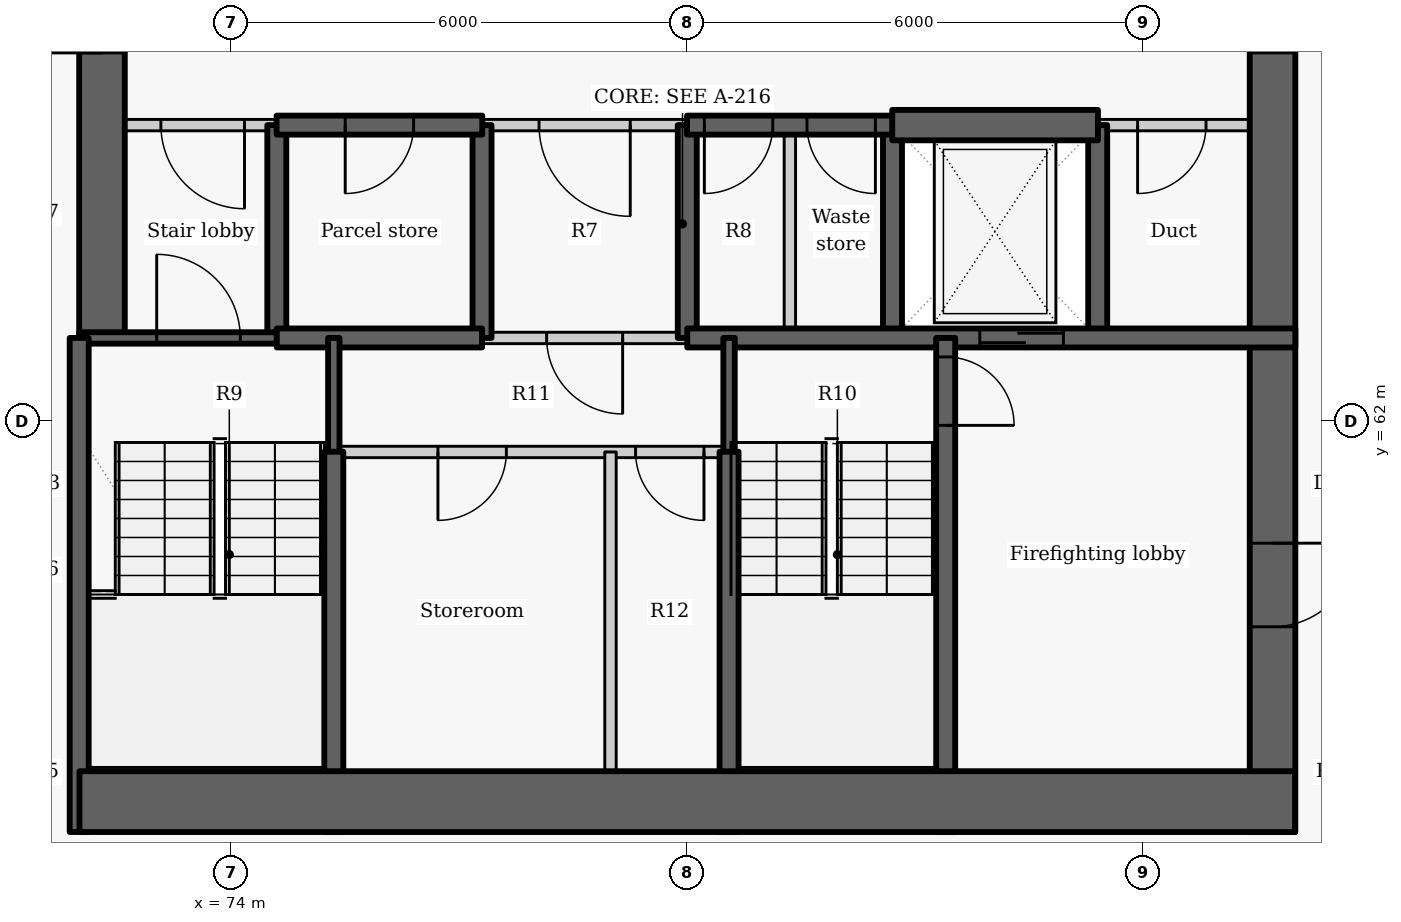
"""IFC4 building model, lengths in metres.
Left out: names, types, materials, properties, quantities, classifications, styles, units other than length and angle.
Written with IfcOpenShell. Run it as: python <this file> out.ifc"""

import sys

from ifc_helpers import new_model, si_unit, direction, frame, frame_2d, origin, place, context, subcontext, project, spatial, rectangle, extrude, element, fill, save


model = new_model("IFC4")
c1 = context("Model", 3, precision=1e-05, world=origin(), true_north=direction((0.0, 1.0)))
c2 = subcontext(c1, "Body", "Model", "MODEL_VIEW")
j1 = project(units=[si_unit("LENGTHUNIT", "METRE"), si_unit("PLANEANGLEUNIT", "RADIAN")], contexts=[c1])
p1 = place(None, origin())
s1 = spatial("IfcSite", under=j1, at=p1, CompositionType="ELEMENT")
p2 = place(p1, origin())
s2 = spatial("IfcBuilding", under=s1, at=p2, CompositionType="ELEMENT")
p3 = place(p2, frame((0.0, 0.0, 77.7)))
s3 = spatial("IfcBuildingStorey", under=s2, at=p3, CompositionType="ELEMENT", Elevation=77.7)
p4 = place(p3, frame((74.6, 63.1, -0.41), z_axis=(0.0, 0.0, 1.0), x_axis=(0.0, 1.0, 0.0)))
e1 = element("IfcWall", 1, at=p4, inside=s3, PredefinedType="SHEAR", context=c2, shape_type="SweptSolid", body=[
    extrude(rectangle(XDim=2.8, YDim=0.25, at=frame_2d((1.4, 0.0))), origin(), (0.0, 0.0, 1.0), 3.435),
])
p5 = place(p3, frame((72.3, 63.1, -0.41), z_axis=(0.0, 0.0, 1.0), x_axis=(0.0, 1.0, 0.0)))
e2 = element("IfcWall", 2, at=p5, inside=s3, PredefinedType="SHEAR", context=c2, shape_type="SweptSolid", body=[
    extrude(rectangle(XDim=9.1, YDim=0.6, at=frame_2d((4.55, 0.0))), origin(), (0.0, 0.0, 1.0), 3.435),
])
p6 = place(p5, frame((3.75, 0.0, 0.41)))
e3 = element("IfcOpeningElement", 3, at=p6, cuts=e2, PredefinedType="OPENING", context=c2, shape_type="SweptSolid", body=[
    extrude(rectangle(XDim=1.5, YDim=2.1, at=frame_2d((0.75, 1.05))), frame((0.0, 0.31, 0.0), z_axis=(0.0, -1.0, 0.0), x_axis=(1.0, 0.0, 0.0)), (0.0, 0.0, 1.0), 0.62),
])
for number, where, z_axis, x_axis in (
    (4, (77.3, 63.1, -0.41), (0.0, 0.0, 1.0), (0.0, 1.0, 0.0)),
    (5, (80.0, 63.1, -0.41), (0.0, 0.0, 1.0), (0.0, 1.0, 0.0)),
    (6, (82.7, 63.1, -0.41), (0.0, 0.0, 1.0), (0.0, 1.0, 0.0)),
    (7, (85.4, 63.1, -0.41), (0.0, 0.0, 1.0), (0.0, 1.0, 0.0)),
):
    element("IfcWall", number, at=place(p3, frame(where, z_axis=z_axis, x_axis=x_axis)), inside=s3, PredefinedType="SHEAR", context=c2, shape_type="SweptSolid", body=[
        extrude(rectangle(XDim=2.8, YDim=0.25, at=frame_2d((1.4, 0.0))), origin(), (0.0, 0.0, 1.0), 3.435),
    ])
p7 = place(p3, frame((87.7, 72.2, -0.41), z_axis=(0.0, 0.0, 1.0), x_axis=(0.0, -1.0, 0.0)))
e8 = element("IfcWall", 8, at=p7, inside=s3, PredefinedType="SHEAR", context=c2, shape_type="SweptSolid", body=[
    extrude(rectangle(XDim=15.6, YDim=0.6, at=frame_2d((7.8, 0.0))), origin(), (0.0, 0.0, 1.0), 3.435),
])
p8 = place(p7, frame((3.85, 0.0, 0.41)))
e9 = element("IfcOpeningElement", 9, at=p8, cuts=e8, PredefinedType="OPENING", context=c2, shape_type="SweptSolid", body=[
    extrude(rectangle(XDim=1.5, YDim=2.1, at=frame_2d((0.75, 1.05))), frame((0.0, 0.31, 0.0), z_axis=(0.0, -1.0, 0.0), x_axis=(1.0, 0.0, 0.0)), (0.0, 0.0, 1.0), 0.62),
])
p9 = place(p7, frame((11.8, 0.0, 0.41)))
e10 = element("IfcOpeningElement", 10, at=p9, cuts=e8, PredefinedType="OPENING", context=c2, shape_type="SweptSolid", body=[
    extrude(rectangle(XDim=1.1, YDim=2.1, at=frame_2d((0.55, 1.05))), frame((0.0, 0.31, 0.0), z_axis=(0.0, -1.0, 0.0), x_axis=(1.0, 0.0, 0.0)), (0.0, 0.0, 1.0), 0.62),
])
p10 = place(p3, frame((74.603, 65.9, 0.0), z_axis=(0.0, 0.0, 1.0), x_axis=(-1.0, 0.0, 0.0)))
e11 = element("IfcWall", 11, at=p10, inside=s3, PredefinedType="PARTITIONING", context=c2, shape_type="SweptSolid", body=[
    extrude(rectangle(XDim=2.603, YDim=0.15, at=frame_2d((1.302, 0.0))), origin(), (0.0, 0.0, 1.0), 3.025),
])
p11 = place(p10, frame((0.428, 0.0, 0.0)))
e12 = element("IfcOpeningElement", 12, at=p11, cuts=e11, PredefinedType="OPENING", context=c2, shape_type="SweptSolid", body=[
    extrude(rectangle(XDim=1.1, YDim=2.1, at=frame_2d((0.55, 1.05))), frame((0.0, 0.085, 0.0), z_axis=(0.0, -1.0, 0.0), x_axis=(1.0, 0.0, 0.0)), (0.0, 0.0, 1.0), 0.17),
])
p12 = place(p3, frame((80.003, 65.9, 0.0), z_axis=(0.0, 0.0, 1.0), x_axis=(-1.0, 0.0, 0.0)))
e13 = element("IfcWall", 13, at=p12, inside=s3, PredefinedType="PARTITIONING", context=c2, shape_type="SweptSolid", body=[
    extrude(rectangle(XDim=2.706, YDim=0.15, at=frame_2d((1.353, 0.0))), origin(), (0.0, 0.0, 1.0), 3.025),
])
p13 = place(p12, frame((0.753, 0.0, 0.0)))
e14 = element("IfcOpeningElement", 14, at=p13, cuts=e13, PredefinedType="OPENING", context=c2, shape_type="SweptSolid", body=[
    extrude(rectangle(XDim=1.2, YDim=2.1, at=frame_2d((0.6, 1.05))), frame((0.0, 0.085, 0.0), z_axis=(0.0, -1.0, 0.0), x_axis=(1.0, 0.0, 0.0)), (0.0, 0.0, 1.0), 0.17),
])
p14 = place(p3, frame((88.0, 65.9, 0.0), z_axis=(0.0, 0.0, 1.0), x_axis=(-1.0, 0.0, 0.0)))
e15 = element("IfcWall", 15, at=p14, inside=s3, PredefinedType="PARTITIONING", context=c2, shape_type="SweptSolid", body=[
    extrude(rectangle(XDim=2.603, YDim=0.15, at=frame_2d((1.302, 0.0))), origin(), (0.0, 0.0, 1.0), 3.025),
])
p15 = place(p14, frame((1.175, 0.0, 0.0)))
e16 = element("IfcOpeningElement", 16, at=p15, cuts=e15, PredefinedType="OPENING", context=c2, shape_type="SweptSolid", body=[
    extrude(rectangle(XDim=0.9, YDim=2.1, at=frame_2d((0.45, 1.05))), frame((0.0, 0.085, 0.0), z_axis=(0.0, -1.0, 0.0), x_axis=(1.0, 0.0, 0.0)), (0.0, 0.0, 1.0), 0.17),
])
p16 = place(p3, frame((77.303, 65.9, -0.41), z_axis=(0.0, 0.0, 1.0), x_axis=(-1.0, 0.0, 0.0)))
e17 = element("IfcWall", 17, at=p16, inside=s3, PredefinedType="SHEAR", context=c2, shape_type="SweptSolid", body=[
    extrude(rectangle(XDim=2.706, YDim=0.25, at=frame_2d((1.353, 0.0))), origin(), (0.0, 0.0, 1.0), 3.435),
])
p17 = place(p16, frame((0.903, 0.0, 0.41)))
e18 = element("IfcOpeningElement", 18, at=p17, cuts=e17, PredefinedType="OPENING", context=c2, shape_type="SweptSolid", body=[
    extrude(rectangle(XDim=0.9, YDim=2.1, at=frame_2d((0.45, 1.05))), frame((0.0, 0.135, 0.0), z_axis=(0.0, -1.0, 0.0), x_axis=(1.0, 0.0, 0.0)), (0.0, 0.0, 1.0), 0.27),
])
p18 = place(p3, frame((82.703, 65.9, -0.41), z_axis=(0.0, 0.0, 1.0), x_axis=(-1.0, 0.0, 0.0)))
e19 = element("IfcWall", 19, at=p18, inside=s3, PredefinedType="SHEAR", context=c2, shape_type="SweptSolid", body=[
    extrude(rectangle(XDim=2.706, YDim=0.25, at=frame_2d((1.353, 0.0))), origin(), (0.0, 0.0, 1.0), 3.435),
])
p19 = place(p18, frame((1.578, 0.0, 0.41)))
e20 = element("IfcOpeningElement", 20, at=p19, cuts=e19, PredefinedType="OPENING", context=c2, shape_type="SweptSolid", body=[
    extrude(rectangle(XDim=0.9, YDim=2.1, at=frame_2d((0.45, 1.05))), frame((0.0, 0.135, 0.0), z_axis=(0.0, -1.0, 0.0), x_axis=(1.0, 0.0, 0.0)), (0.0, 0.0, 1.0), 0.27),
])
p20 = place(p18, frame((0.228, 0.0, 0.41)))
e21 = element("IfcOpeningElement", 21, at=p20, cuts=e19, PredefinedType="OPENING", context=c2, shape_type="SweptSolid", body=[
    extrude(rectangle(XDim=0.9, YDim=2.1, at=frame_2d((0.45, 1.05))), frame((0.0, 0.135, 0.0), z_axis=(0.0, -1.0, 0.0), x_axis=(1.0, 0.0, 0.0)), (0.0, 0.0, 1.0), 0.27),
])
p21 = place(p3, frame((82.697, 65.9, -0.41), z_axis=(0.0, 0.0, 1.0), x_axis=(1.0, 0.0, 0.0)))
e22 = element("IfcWall", 22, at=p21, inside=s3, PredefinedType="SHEAR", context=c2, shape_type="SweptSolid", body=[
    extrude(rectangle(XDim=2.706, YDim=0.4, at=frame_2d((1.353, 0.0))), origin(), (0.0, 0.0, 1.0), 3.435),
])
p22 = place(p3, frame((72.0, 63.1, -0.41), z_axis=(0.0, 0.0, 1.0), x_axis=(1.0, 0.0, 0.0)))
e23 = element("IfcWall", 23, at=p22, inside=s3, PredefinedType="SHEAR", context=c2, shape_type="SweptSolid", body=[
    extrude(rectangle(XDim=2.6, YDim=0.15, at=frame_2d((1.3, 0.0))), origin(), (0.0, 0.0, 1.0), 3.435),
])
p23 = place(p22, frame((1.02, 0.0, 0.41)))
e24 = element("IfcOpeningElement", 24, at=p23, cuts=e23, PredefinedType="OPENING", context=c2, shape_type="SweptSolid", body=[
    extrude(rectangle(XDim=1.1, YDim=2.1, at=frame_2d((0.55, 1.05))), frame((0.0, 0.085, 0.0), z_axis=(0.0, -1.0, 0.0), x_axis=(1.0, 0.0, 0.0)), (0.0, 0.0, 1.0), 0.17),
])
p24 = place(p3, frame((74.6, 63.1, -0.41), z_axis=(0.0, 0.0, 1.0), x_axis=(1.0, 0.0, 0.0)))
e25 = element("IfcWall", 25, at=p24, inside=s3, PredefinedType="SHEAR", context=c2, shape_type="SweptSolid", body=[
    extrude(rectangle(XDim=2.7, YDim=0.25, at=frame_2d((1.35, 0.0))), origin(), (0.0, 0.0, 1.0), 3.435),
])
p25 = place(p3, frame((80.0, 63.1, -0.41), z_axis=(0.0, 0.0, 1.0), x_axis=(1.0, 0.0, 0.0)))
e26 = element("IfcWall", 26, at=p25, inside=s3, PredefinedType="SHEAR", context=c2, shape_type="SweptSolid", body=[
    extrude(rectangle(XDim=8.0, YDim=0.25, at=frame_2d((4.0, 0.0))), origin(), (0.0, 0.0, 1.0), 3.435),
])
p26 = place(p25, frame((3.849, 0.0, 0.41)))
e27 = element("IfcOpeningElement", 27, at=p26, cuts=e26, PredefinedType="OPENING", context=c2, shape_type="SweptSolid", body=[
    extrude(rectangle(XDim=1.1, YDim=2.1, at=frame_2d((0.55, 1.05))), frame((0.0, 0.135, 0.0), z_axis=(0.0, -1.0, 0.0), x_axis=(1.0, 0.0, 0.0)), (0.0, 0.0, 1.0), 0.27),
])
p27 = place(p3, frame((80.0, 63.1, 0.0), z_axis=(0.0, 0.0, 1.0), x_axis=(-1.0, 0.0, 0.0)))
e28 = element("IfcWall", 28, at=p27, inside=s3, PredefinedType="PARTITIONING", context=c2, shape_type="SweptSolid", body=[
    extrude(rectangle(XDim=2.7, YDim=0.15, at=frame_2d((1.35, 0.0))), origin(), (0.0, 0.0, 1.0), 3.025),
])
p28 = place(p27, frame((0.85, 0.0, 0.0)))
e29 = element("IfcOpeningElement", 29, at=p28, cuts=e28, PredefinedType="OPENING", context=c2, shape_type="SweptSolid", body=[
    extrude(rectangle(XDim=1.0, YDim=2.1, at=frame_2d((0.5, 1.05))), frame((0.0, 0.085, 0.0), z_axis=(0.0, -1.0, 0.0), x_axis=(1.0, 0.0, 0.0)), (0.0, 0.0, 1.0), 0.17),
])
p29 = place(p3, frame((81.35, 63.1, 0.0), z_axis=(0.0, 0.0, 1.0), x_axis=(0.0, 1.0, 0.0)))
e30 = element("IfcWall", 30, at=p29, inside=s3, PredefinedType="PARTITIONING", context=c2, shape_type="SweptSolid", body=[
    extrude(rectangle(XDim=2.8, YDim=0.15, at=frame_2d((1.4, 0.0))), origin(), (0.0, 0.0, 1.0), 3.025),
])
p30 = place(p3, frame((75.35, 61.597, -0.41), z_axis=(0.0, 0.0, 1.0), x_axis=(0.0, 1.0, 0.0)))
e31 = element("IfcWall", 31, at=p30, inside=s3, PredefinedType="SHEAR", context=c2, shape_type="SweptSolid", body=[
    extrude(rectangle(XDim=1.503, YDim=0.15, at=frame_2d((0.751, 0.0))), origin(), (0.0, 0.0, 1.0), 3.435),
])
p31 = place(p3, frame((75.35, 56.6, -0.41), z_axis=(0.0, 0.0, 1.0), x_axis=(0.0, 1.0, 0.0)))
e32 = element("IfcWall", 32, at=p31, inside=s3, PredefinedType="SHEAR", context=c2, shape_type="SweptSolid", body=[
    extrude(rectangle(XDim=5.003, YDim=0.25, at=frame_2d((2.501, 0.0))), origin(), (0.0, 0.0, 1.0), 3.435),
])
p32 = place(p3, frame((72.0, 56.6, -0.41), z_axis=(0.0, 0.0, 1.0), x_axis=(0.0, 1.0, 0.0)))
e33 = element("IfcWall", 33, at=p32, inside=s3, PredefinedType="SHEAR", context=c2, shape_type="SweptSolid", body=[
    extrude(rectangle(XDim=6.5, YDim=0.25, at=frame_2d((3.25, 0.0))), origin(), (0.0, 0.0, 1.0), 3.435),
])
p33 = place(p3, frame((83.4, 63.1, -0.41), z_axis=(0.0, 0.0, 1.0), x_axis=(0.0, -1.0, 0.0)))
e34 = element("IfcWall", 34, at=p33, inside=s3, PredefinedType="SHEAR", context=c2, shape_type="SweptSolid", body=[
    extrude(rectangle(XDim=6.5, YDim=0.25, at=frame_2d((3.25, 0.0))), origin(), (0.0, 0.0, 1.0), 3.435),
])
p34 = place(p33, frame((0.25, 0.0, 0.41)))
e35 = element("IfcOpeningElement", 35, at=p34, cuts=e34, PredefinedType="OPENING", context=c2, shape_type="SweptSolid", body=[
    extrude(rectangle(XDim=0.9, YDim=2.1, at=frame_2d((0.45, 1.05))), frame((0.0, 0.135, 0.0), z_axis=(0.0, -1.0, 0.0), x_axis=(1.0, 0.0, 0.0)), (0.0, 0.0, 1.0), 0.27),
])
p35 = place(p3, frame((80.55, 61.597, -0.41), z_axis=(0.0, 0.0, 1.0), x_axis=(0.0, 1.0, 0.0)))
e36 = element("IfcWall", 36, at=p35, inside=s3, PredefinedType="SHEAR", context=c2, shape_type="SweptSolid", body=[
    extrude(rectangle(XDim=1.503, YDim=0.15, at=frame_2d((0.751, 0.0))), origin(), (0.0, 0.0, 1.0), 3.435),
])
p36 = place(p3, frame((80.55, 56.6, -0.41), z_axis=(0.0, 0.0, 1.0), x_axis=(0.0, 1.0, 0.0)))
e37 = element("IfcWall", 37, at=p36, inside=s3, PredefinedType="SHEAR", context=c2, shape_type="SweptSolid", body=[
    extrude(rectangle(XDim=5.003, YDim=0.25, at=frame_2d((2.501, 0.0))), origin(), (0.0, 0.0, 1.0), 3.435),
])
p37 = place(p3, frame((80.55, 61.6, 0.0), z_axis=(0.0, 0.0, 1.0), x_axis=(-1.0, 0.0, 0.0)))
e38 = element("IfcWall", 38, at=p37, inside=s3, PredefinedType="PARTITIONING", context=c2, shape_type="SweptSolid", body=[
    extrude(rectangle(XDim=5.2, YDim=0.15, at=frame_2d((2.6, 0.0))), origin(), (0.0, 0.0, 1.0), 3.025),
])
p38 = place(p37, frame((2.93, 0.0, 0.0)))
e39 = element("IfcOpeningElement", 39, at=p38, cuts=e38, PredefinedType="OPENING", context=c2, shape_type="SweptSolid", body=[
    extrude(rectangle(XDim=0.9, YDim=2.1, at=frame_2d((0.45, 1.05))), frame((0.0, 0.085, 0.0), z_axis=(0.0, -1.0, 0.0), x_axis=(1.0, 0.0, 0.0)), (0.0, 0.0, 1.0), 0.17),
])
p39 = place(p37, frame((0.33, 0.0, 0.0)))
e40 = element("IfcOpeningElement", 40, at=p39, cuts=e38, PredefinedType="OPENING", context=c2, shape_type="SweptSolid", body=[
    extrude(rectangle(XDim=0.9, YDim=2.1, at=frame_2d((0.45, 1.05))), frame((0.0, 0.085, 0.0), z_axis=(0.0, -1.0, 0.0), x_axis=(1.0, 0.0, 0.0)), (0.0, 0.0, 1.0), 0.17),
])
p40 = place(p3, frame((78.99, 56.6, 0.0), z_axis=(0.0, 0.0, 1.0), x_axis=(0.0, 1.0, 0.0)))
e41 = element("IfcWall", 41, at=p40, inside=s3, PredefinedType="PARTITIONING", context=c2, shape_type="SweptSolid", body=[
    extrude(rectangle(XDim=5.0, YDim=0.15, at=frame_2d((2.5, 0.0))), origin(), (0.0, 0.0, 1.0), 3.025),
])
p41 = place(p3, frame((72.004, 57.0, -0.41), z_axis=(0.0, 0.0, 1.0), x_axis=(1.0, 0.0, 0.0)))
e42 = element("IfcWall", 42, at=p41, inside=s3, PredefinedType="SHEAR", context=c2, shape_type="SweptSolid", body=[
    extrude(rectangle(XDim=15.992, YDim=0.8, at=frame_2d((7.996, 0.0))), origin(), (0.0, 0.0, 1.0), 3.435),
])
p42 = place(p11, origin())
e43 = element("IfcDoor", 43, at=p42, inside=s3, OperationType="SINGLE_SWING_LEFT", PredefinedType="DOOR", context=c2, shape_type="SweptSolid", body=[
    extrude(rectangle(XDim=1.1, YDim=2.1, at=frame_2d((0.55, 1.05))), frame((0.0, 0.025, 0.0), z_axis=(0.0, -1.0, 0.0), x_axis=(1.0, 0.0, 0.0)), (0.0, 0.0, 1.0), 0.05),
])
fill(e12, e43)
p43 = place(p17, origin())
e44 = element("IfcDoor", 44, at=p43, inside=s3, OperationType="SINGLE_SWING_RIGHT", PredefinedType="DOOR", context=c2, shape_type="SweptSolid", body=[
    extrude(rectangle(XDim=0.9, YDim=2.1, at=frame_2d((0.45, 1.05))), frame((0.0, 0.025, 0.0), z_axis=(0.0, -1.0, 0.0), x_axis=(1.0, 0.0, 0.0)), (0.0, 0.0, 1.0), 0.05),
])
fill(e18, e44)
p44 = place(p13, origin())
e45 = element("IfcDoor", 45, at=p44, inside=s3, OperationType="DOUBLE_DOOR_SINGLE_SWING", PredefinedType="DOOR", context=c2, shape_type="SweptSolid", body=[
    extrude(rectangle(XDim=1.2, YDim=2.1, at=frame_2d((0.6, 1.05))), frame((0.0, 0.025, 0.0), z_axis=(0.0, -1.0, 0.0), x_axis=(1.0, 0.0, 0.0)), (0.0, 0.0, 1.0), 0.05),
])
fill(e14, e45)
p45 = place(p19, origin())
e46 = element("IfcDoor", 46, at=p45, inside=s3, OperationType="SINGLE_SWING_RIGHT", PredefinedType="DOOR", context=c2, shape_type="SweptSolid", body=[
    extrude(rectangle(XDim=0.9, YDim=2.1, at=frame_2d((0.45, 1.05))), frame((0.0, 0.025, 0.0), z_axis=(0.0, -1.0, 0.0), x_axis=(1.0, 0.0, 0.0)), (0.0, 0.0, 1.0), 0.05),
])
fill(e20, e46)
p46 = place(p20, origin())
e47 = element("IfcDoor", 47, at=p46, inside=s3, OperationType="SINGLE_SWING_LEFT", PredefinedType="DOOR", context=c2, shape_type="SweptSolid", body=[
    extrude(rectangle(XDim=0.9, YDim=2.1, at=frame_2d((0.45, 1.05))), frame((0.0, 0.025, 0.0), z_axis=(0.0, -1.0, 0.0), x_axis=(1.0, 0.0, 0.0)), (0.0, 0.0, 1.0), 0.05),
])
fill(e21, e47)
p47 = place(p26, origin())
e48 = element("IfcDoor", 48, at=p47, inside=s3, OperationType="SLIDING_TO_LEFT", PredefinedType="DOOR", context=c2, shape_type="SweptSolid", body=[
    extrude(rectangle(XDim=1.1, YDim=2.1, at=frame_2d((0.55, 1.05))), frame((0.0, 0.025, 0.0), z_axis=(0.0, -1.0, 0.0), x_axis=(1.0, 0.0, 0.0)), (0.0, 0.0, 1.0), 0.05),
])
fill(e27, e48)
p48 = place(p15, origin())
e49 = element("IfcDoor", 49, at=p48, inside=s3, OperationType="SINGLE_SWING_RIGHT", PredefinedType="DOOR", context=c2, shape_type="SweptSolid", body=[
    extrude(rectangle(XDim=0.9, YDim=2.1, at=frame_2d((0.45, 1.05))), frame((0.0, 0.025, 0.0), z_axis=(0.0, -1.0, 0.0), x_axis=(1.0, 0.0, 0.0)), (0.0, 0.0, 1.0), 0.05),
])
fill(e16, e49)
p49 = place(p28, origin())
e50 = element("IfcDoor", 50, at=p49, inside=s3, OperationType="SINGLE_SWING_LEFT", PredefinedType="DOOR", context=c2, shape_type="SweptSolid", body=[
    extrude(rectangle(XDim=1.0, YDim=2.1, at=frame_2d((0.5, 1.05))), frame((0.0, 0.025, 0.0), z_axis=(0.0, -1.0, 0.0), x_axis=(1.0, 0.0, 0.0)), (0.0, 0.0, 1.0), 0.05),
])
fill(e29, e50)
p50 = place(p38, origin())
e51 = element("IfcDoor", 51, at=p50, inside=s3, OperationType="SINGLE_SWING_RIGHT", PredefinedType="DOOR", context=c2, shape_type="SweptSolid", body=[
    extrude(rectangle(XDim=0.9, YDim=2.1, at=frame_2d((0.45, 1.05))), frame((0.0, 0.025, 0.0), z_axis=(0.0, -1.0, 0.0), x_axis=(1.0, 0.0, 0.0)), (0.0, 0.0, 1.0), 0.05),
])
fill(e39, e51)
p51 = place(p39, origin())
e52 = element("IfcDoor", 52, at=p51, inside=s3, OperationType="SINGLE_SWING_LEFT", PredefinedType="DOOR", context=c2, shape_type="SweptSolid", body=[
    extrude(rectangle(XDim=0.9, YDim=2.1, at=frame_2d((0.45, 1.05))), frame((0.0, 0.025, 0.0), z_axis=(0.0, -1.0, 0.0), x_axis=(1.0, 0.0, 0.0)), (0.0, 0.0, 1.0), 0.05),
])
fill(e40, e52)
p52 = place(p23, origin())
e53 = element("IfcDoor", 53, at=p52, inside=s3, OperationType="SINGLE_SWING_LEFT", PredefinedType="DOOR", context=c2, shape_type="SweptSolid", body=[
    extrude(rectangle(XDim=1.1, YDim=2.1, at=frame_2d((0.55, 1.05))), frame((0.0, 0.025, 0.0), z_axis=(0.0, -1.0, 0.0), x_axis=(1.0, 0.0, 0.0)), (0.0, 0.0, 1.0), 0.05),
])
fill(e24, e53)
p53 = place(p34, origin())
e54 = element("IfcDoor", 54, at=p53, inside=s3, OperationType="SINGLE_SWING_RIGHT", PredefinedType="DOOR", context=c2, shape_type="SweptSolid", body=[
    extrude(rectangle(XDim=0.9, YDim=2.1, at=frame_2d((0.45, 1.05))), frame((0.0, 0.025, 0.0), z_axis=(0.0, -1.0, 0.0), x_axis=(1.0, 0.0, 0.0)), (0.0, 0.0, 1.0), 0.05),
])
fill(e35, e54)
p54 = place(p8, origin())
e55 = element("IfcDoor", 55, at=p54, inside=s3, OperationType="DOUBLE_DOOR_SINGLE_SWING", PredefinedType="DOOR", context=c2, shape_type="SweptSolid", body=[
    extrude(rectangle(XDim=1.5, YDim=2.1, at=frame_2d((0.75, 1.05))), frame((0.0, 0.025, 0.0), z_axis=(0.0, -1.0, 0.0), x_axis=(1.0, 0.0, 0.0)), (0.0, 0.0, 1.0), 0.05),
])
fill(e9, e55)
p55 = place(p9, origin())
e56 = element("IfcDoor", 56, at=p55, inside=s3, OperationType="SINGLE_SWING_LEFT", PredefinedType="DOOR", context=c2, shape_type="SweptSolid", body=[
    extrude(rectangle(XDim=1.1, YDim=2.1, at=frame_2d((0.55, 1.05))), frame((0.0, 0.025, 0.0), z_axis=(0.0, -1.0, 0.0), x_axis=(1.0, 0.0, 0.0)), (0.0, 0.0, 1.0), 0.05),
])
fill(e10, e56)
save(model, sys.argv[1])
